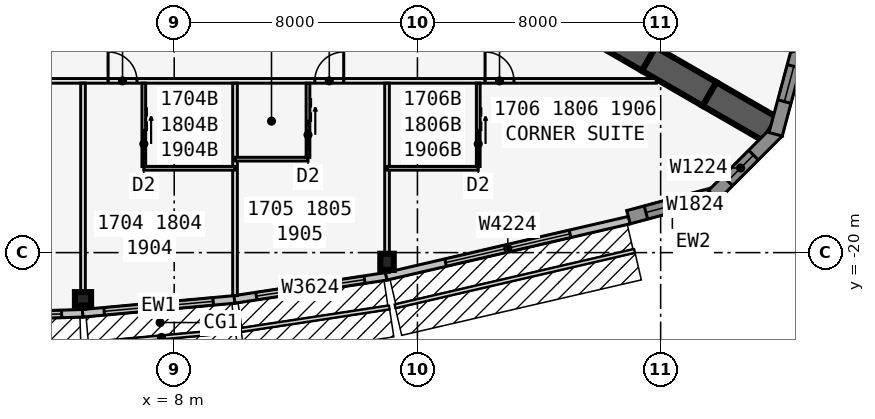
"""IFC4 building model, lengths in metres.
Left out: names, types, materials, properties, quantities, classifications, styles, units other than length and angle.
Written with IfcOpenShell. Run it as: python <this file> out.ifc"""

import sys

from ifc_helpers import new_model, si_unit, direction, frame, frame_2d, origin, origin_2d, place, context, subcontext, project, spatial, polyline, rectangle, i_section, outline, extrude, element, fill, save


model = new_model("IFC4")
c1 = context("Model", 3, precision=1e-05, world=origin(), true_north=direction((0.0, 1.0)))
c2 = subcontext(c1, "Body", "Model", "MODEL_VIEW")
j1 = project(units=[si_unit("LENGTHUNIT", "METRE"), si_unit("PLANEANGLEUNIT", "RADIAN")], contexts=[c1])
p1 = place(None, origin())
s1 = spatial("IfcSite", under=j1, at=p1, CompositionType="ELEMENT")
p2 = place(p1, origin())
s2 = spatial("IfcBuilding", under=s1, at=p2, CompositionType="ELEMENT")
p3 = place(p2, frame((0.0, 0.0, 69.3)))
s3 = spatial("IfcBuildingStorey", under=s2, at=p3, CompositionType="ELEMENT", Elevation=69.3)
for number, where, z_axis, x_axis in (
    (1, (21.61, -12.477, 0.0), (0.0, 0.0, 1.0), (0.866, -0.5, 0.0)),
    (2, (23.61, -13.631, 0.0), (0.0, 0.0, 1.0), (0.866, -0.5, 0.0)),
    (3, (25.61, -14.786, 0.0), (0.0, 0.0, 1.0), (0.866, -0.5, 0.0)),
):
    element("IfcWall", number, at=place(p3, frame(where, z_axis=z_axis, x_axis=x_axis)), inside=s3, PredefinedType="SHEAR", context=c2, shape_type="SweptSolid", body=[
        extrude(rectangle(XDim=2.309, YDim=0.9, at=frame_2d((1.155, 0.0))), origin(), (0.0, 0.0, 1.0), 3.4),
    ])
for number, where, z_axis, x_axis in (
    (4, (5.0, -21.521, 0.0), (0.0, 0.0, 1.0), (0.0, -1.0, 0.0)),
    (5, (15.0, -20.303, 0.0), (0.0, 0.0, 1.0), (1.0, 0.0, 0.0)),
):
    element("IfcColumn", number, at=place(p3, frame(where, z_axis=z_axis, x_axis=x_axis)), inside=s3, PredefinedType="COLUMN", context=c2, shape_type="SweptSolid", body=[
        extrude(i_section(OverallWidth=0.442, OverallDepth=0.531, WebThickness=0.066, FlangeThickness=0.106, at=origin_2d()), origin(), (0.0, 0.0, 1.0), 3.4),
    ])
p4 = place(p3, frame((-0.004, -22.148, 0.0), z_axis=(0.0, 0.0, 1.0), x_axis=(0.999537635046, 0.030405856769, 0.0)))
e6 = element("IfcWall", 6, at=p4, inside=s3, PredefinedType="STANDARD", context=c2, shape_type="SweptSolid", body=[
    extrude(rectangle(XDim=5.002, YDim=0.25, at=frame_2d((2.501, 0.0))), origin(), (0.0, 0.0, 1.0), 3.235),
])
p5 = place(p4, frame((0.701, 0.0, 0.45)))
e7 = element("IfcOpeningElement", 7, at=p5, cuts=e6, PredefinedType="OPENING", context=c2, shape_type="SweptSolid", body=[
    extrude(rectangle(XDim=3.6, YDim=2.4, at=frame_2d((1.8, 1.2))), frame((0.0, 0.135, 0.0), z_axis=(0.0, -1.0, 0.0), x_axis=(1.0, 0.0, 0.0)), (0.0, 0.0, 1.0), 0.27),
])
p6 = place(p3, frame((4.989, -21.996, 0.0), z_axis=(0.0, 0.0, 1.0), x_axis=(0.995857256774, 0.090930325692, 0.0)))
e8 = element("IfcWall", 8, at=p6, inside=s3, PredefinedType="STANDARD", context=c2, shape_type="SweptSolid", body=[
    extrude(rectangle(XDim=5.021, YDim=0.25, at=frame_2d((2.51, 0.0))), origin(), (0.0, 0.0, 1.0), 3.235),
])
p7 = place(p6, frame((0.71, 0.0, 0.45)))
e9 = element("IfcOpeningElement", 9, at=p7, cuts=e8, PredefinedType="OPENING", context=c2, shape_type="SweptSolid", body=[
    extrude(rectangle(XDim=3.6, YDim=2.4, at=frame_2d((1.8, 1.2))), frame((0.0, 0.135, 0.0), z_axis=(0.0, -1.0, 0.0), x_axis=(1.0, 0.0, 0.0)), (0.0, 0.0, 1.0), 0.27),
])
p8 = place(p3, frame((9.981, -21.54, 0.0), z_axis=(0.0, 0.0, 1.0), x_axis=(0.988615403399, 0.150464561152, 0.0)))
e10 = element("IfcWall", 10, at=p8, inside=s3, PredefinedType="STANDARD", context=c2, shape_type="SweptSolid", body=[
    extrude(rectangle(XDim=5.058, YDim=0.25, at=frame_2d((2.529, 0.0))), origin(), (0.0, 0.0, 1.0), 3.235),
])
p9 = place(p8, frame((0.729, 0.0, 0.45)))
e11 = element("IfcOpeningElement", 11, at=p9, cuts=e10, PredefinedType="OPENING", context=c2, shape_type="SweptSolid", body=[
    extrude(rectangle(XDim=3.6, YDim=2.4, at=frame_2d((1.8, 1.2))), frame((0.0, 0.135, 0.0), z_axis=(0.0, -1.0, 0.0), x_axis=(1.0, 0.0, 0.0)), (0.0, 0.0, 1.0), 0.27),
])
p10 = place(p3, frame((14.972, -20.781, 0.0), z_axis=(0.0, 0.0, 1.0), x_axis=(0.974279327392, 0.225343720163, 0.0)))
e12 = element("IfcWall", 12, at=p10, inside=s3, PredefinedType="STANDARD", context=c2, shape_type="SweptSolid", body=[
    extrude(rectangle(XDim=8.211, YDim=0.25, at=frame_2d((4.105, 0.0))), origin(), (0.0, 0.0, 1.0), 3.235),
])
p11 = place(p10, frame((2.006, 0.0, 0.45)))
e13 = element("IfcOpeningElement", 13, at=p11, cuts=e12, PredefinedType="OPENING", context=c2, shape_type="SweptSolid", body=[
    extrude(rectangle(XDim=4.2, YDim=2.4, at=frame_2d((2.1, 1.2))), frame((0.0, 0.135, 0.0), z_axis=(0.0, -1.0, 0.0), x_axis=(1.0, 0.0, 0.0)), (0.0, 0.0, 1.0), 0.27),
])
p12 = place(p3, frame((22.942, -18.835, 0.0), z_axis=(0.0, 0.0, 1.0), x_axis=(0.965930548995, 0.258801419081, 0.0)))
e14 = element("IfcWall", 14, at=p12, inside=s3, PredefinedType="SOLIDWALL", context=c2, shape_type="SweptSolid", body=[
    extrude(rectangle(XDim=2.989, YDim=0.45, at=frame_2d((1.494, 0.0))), origin(), (0.0, 0.0, 1.0), 3.235),
])
p13 = place(p12, frame((0.594, 0.0, 0.45)))
e15 = element("IfcOpeningElement", 15, at=p13, cuts=e14, PredefinedType="OPENING", context=c2, shape_type="SweptSolid", body=[
    extrude(rectangle(XDim=1.8, YDim=2.4, at=frame_2d((0.9, 1.2))), frame((0.0, 0.235, 0.0), z_axis=(0.0, -1.0, 0.0), x_axis=(1.0, 0.0, 0.0)), (0.0, 0.0, 1.0), 0.47),
])
p14 = place(p3, frame((25.728, -18.12, 0.0), z_axis=(0.0, 0.0, 1.0), x_axis=(0.707025086683, 0.707188466253, 0.0)))
e16 = element("IfcWall", 16, at=p14, inside=s3, PredefinedType="SOLIDWALL", context=c2, shape_type="SweptSolid", body=[
    extrude(outline(polyline([(2.989, 0.225), (2.93, 0.225), (2.438, 0.093), (2.402, 0.225), (0.0, 0.225), (0.0, -0.225), (2.989, -0.225), (2.989, 0.225)])), origin(), (0.0, 0.0, 1.0), 3.235),
])
p15 = place(p14, frame((0.676, 0.0, 0.45)))
e17 = element("IfcOpeningElement", 17, at=p15, cuts=e16, PredefinedType="OPENING", context=c2, shape_type="SweptSolid", body=[
    extrude(rectangle(XDim=1.2, YDim=2.4, at=frame_2d((0.6, 1.2))), frame((0.0, 0.235, 0.0), z_axis=(0.0, -1.0, 0.0), x_axis=(1.0, 0.0, 0.0)), (0.0, 0.0, 1.0), 0.47),
])
p16 = place(p3, frame((27.783, -16.108, 0.0), z_axis=(0.0, 0.0, 1.0), x_axis=(0.258801419081, 0.965930548995, 0.0)))
e18 = element("IfcWall", 18, at=p16, inside=s3, PredefinedType="SOLIDWALL", context=c2, shape_type="SweptSolid", body=[
    extrude(outline(polyline([(2.989, 0.225), (0.586, 0.225), (0.551, 0.093), (0.06, 0.225), (0.0, 0.225), (0.0, -0.225), (2.989, -0.225), (2.989, 0.225)])), origin(), (0.0, 0.0, 1.0), 3.235),
])
p17 = place(p16, frame((1.113, 0.0, 0.45)))
e19 = element("IfcOpeningElement", 19, at=p17, cuts=e18, PredefinedType="OPENING", context=c2, shape_type="SweptSolid", body=[
    extrude(rectangle(XDim=1.2, YDim=2.4, at=frame_2d((0.6, 1.2))), frame((0.0, 0.235, 0.0), z_axis=(0.0, -1.0, 0.0), x_axis=(1.0, 0.0, 0.0)), (0.0, 0.0, 1.0), 0.47),
])
p18 = place(p3, frame((-23.857, -14.351, 0.0), z_axis=(0.0, 0.0, 1.0), x_axis=(1.0, 0.0, 0.0)))
e20 = element("IfcWall", 20, at=p18, inside=s3, PredefinedType="PARTITIONING", context=c2, shape_type="SweptSolid", body=[
    extrude(rectangle(XDim=47.714, YDim=0.15, at=frame_2d((23.857, 0.0))), origin(), (0.0, 0.0, 1.0), 3.235),
])
p19 = place(p18, frame((4.682, 0.0, 0.0)))
e21 = element("IfcOpeningElement", 21, at=p19, cuts=e20, PredefinedType="OPENING", context=c2, shape_type="SweptSolid", body=[
    extrude(rectangle(XDim=0.95, YDim=2.13, at=frame_2d((0.475, 1.065))), frame((0.0, 0.085, 0.0), z_axis=(0.0, -1.0, 0.0), x_axis=(1.0, 0.0, 0.0)), (0.0, 0.0, 1.0), 0.17),
])
p20 = place(p18, frame((10.282, 0.0, 0.0)))
e22 = element("IfcOpeningElement", 22, at=p20, cuts=e20, PredefinedType="OPENING", context=c2, shape_type="SweptSolid", body=[
    extrude(rectangle(XDim=0.95, YDim=2.13, at=frame_2d((0.475, 1.065))), frame((0.0, 0.085, 0.0), z_axis=(0.0, -1.0, 0.0), x_axis=(1.0, 0.0, 0.0)), (0.0, 0.0, 1.0), 0.17),
])
p21 = place(p18, frame((15.882, 0.0, 0.0)))
e23 = element("IfcOpeningElement", 23, at=p21, cuts=e20, PredefinedType="OPENING", context=c2, shape_type="SweptSolid", body=[
    extrude(rectangle(XDim=0.95, YDim=2.13, at=frame_2d((0.475, 1.065))), frame((0.0, 0.085, 0.0), z_axis=(0.0, -1.0, 0.0), x_axis=(1.0, 0.0, 0.0)), (0.0, 0.0, 1.0), 0.17),
])
p22 = place(p18, frame((25.857, 0.0, 0.0)))
e24 = element("IfcOpeningElement", 24, at=p22, cuts=e20, PredefinedType="OPENING", context=c2, shape_type="SweptSolid", body=[
    extrude(rectangle(XDim=1.0, YDim=2.13, at=frame_2d((0.5, 1.065))), frame((0.0, 0.085, 0.0), z_axis=(0.0, -1.0, 0.0), x_axis=(1.0, 0.0, 0.0)), (0.0, 0.0, 1.0), 0.17),
])
p23 = place(p18, frame((29.682, 0.0, 0.0)))
e25 = element("IfcOpeningElement", 25, at=p23, cuts=e20, PredefinedType="OPENING", context=c2, shape_type="SweptSolid", body=[
    extrude(rectangle(XDim=0.95, YDim=2.13, at=frame_2d((0.475, 1.065))), frame((0.0, 0.085, 0.0), z_axis=(0.0, -1.0, 0.0), x_axis=(1.0, 0.0, 0.0)), (0.0, 0.0, 1.0), 0.17),
])
p24 = place(p18, frame((36.482, 0.0, 0.0)))
e26 = element("IfcOpeningElement", 26, at=p24, cuts=e20, PredefinedType="OPENING", context=c2, shape_type="SweptSolid", body=[
    extrude(rectangle(XDim=0.95, YDim=2.13, at=frame_2d((0.475, 1.065))), frame((0.0, 0.085, 0.0), z_axis=(0.0, -1.0, 0.0), x_axis=(1.0, 0.0, 0.0)), (0.0, 0.0, 1.0), 0.17),
])
p25 = place(p18, frame((42.082, 0.0, 0.0)))
e27 = element("IfcOpeningElement", 27, at=p25, cuts=e20, PredefinedType="OPENING", context=c2, shape_type="SweptSolid", body=[
    extrude(rectangle(XDim=0.95, YDim=2.13, at=frame_2d((0.475, 1.065))), frame((0.0, 0.085, 0.0), z_axis=(0.0, -1.0, 0.0), x_axis=(1.0, 0.0, 0.0)), (0.0, 0.0, 1.0), 0.17),
])
p26 = place(p3, frame((5.0, -14.426, 0.0), z_axis=(0.0, 0.0, 1.0), x_axis=(0.0, -1.0, 0.0)))
e28 = element("IfcWall", 28, at=p26, inside=s3, PredefinedType="PARTITIONING", context=c2, shape_type="SweptSolid", body=[
    extrude(rectangle(XDim=7.443, YDim=0.15, at=frame_2d((3.722, 0.0))), origin(), (0.0, 0.0, 1.0), 2.389),
])
p27 = place(p3, frame((10.0, -14.426, 0.0), z_axis=(0.0, 0.0, 1.0), x_axis=(0.0, -1.0, 0.0)))
e29 = element("IfcWall", 29, at=p27, inside=s3, PredefinedType="PARTITIONING", context=c2, shape_type="SweptSolid", body=[
    extrude(rectangle(XDim=6.985, YDim=0.15, at=frame_2d((3.492, 0.0))), origin(), (0.0, 0.0, 1.0), 2.389),
])
p28 = place(p3, frame((15.0, -14.426, 0.0), z_axis=(0.0, 0.0, 1.0), x_axis=(0.0, -1.0, 0.0)))
e30 = element("IfcWall", 30, at=p28, inside=s3, PredefinedType="PARTITIONING", context=c2, shape_type="SweptSolid", body=[
    extrude(rectangle(XDim=6.22, YDim=0.15, at=frame_2d((3.11, 0.0))), origin(), (0.0, 0.0, 1.0), 2.389),
])
p29 = place(p3, frame((7.0, -17.226, 0.0), z_axis=(0.0, 0.0, 1.0), x_axis=(1.0, 0.0, 0.0)))
e31 = element("IfcWall", 31, at=p29, inside=s3, PredefinedType="PLUMBINGWALL", context=c2, shape_type="SweptSolid", body=[
    extrude(rectangle(XDim=3.0, YDim=0.12, at=frame_2d((1.5, 0.0))), origin(), (0.0, 0.0, 1.0), 3.235),
])
p30 = place(p3, frame((7.0, -14.426, 0.0), z_axis=(0.0, 0.0, 1.0), x_axis=(0.0, -1.0, 0.0)))
e32 = element("IfcWall", 32, at=p30, inside=s3, PredefinedType="PLUMBINGWALL", context=c2, shape_type="SweptSolid", body=[
    extrude(rectangle(XDim=2.74, YDim=0.12, at=frame_2d((1.37, 0.0))), origin(), (0.0, 0.0, 1.0), 3.235),
])
p31 = place(p30, frame((1.55, 0.0, 0.0)))
e33 = element("IfcOpeningElement", 33, at=p31, cuts=e32, PredefinedType="OPENING", context=c2, shape_type="SweptSolid", body=[
    extrude(rectangle(XDim=0.9, YDim=2.13, at=frame_2d((0.45, 1.065))), frame((0.0, 0.07, 0.0), z_axis=(0.0, -1.0, 0.0), x_axis=(1.0, 0.0, 0.0)), (0.0, 0.0, 1.0), 0.14),
])
p32 = place(p3, frame((10.0, -16.926, 0.0), z_axis=(0.0, 0.0, 1.0), x_axis=(1.0, 0.0, 0.0)))
e34 = element("IfcWall", 34, at=p32, inside=s3, PredefinedType="PLUMBINGWALL", context=c2, shape_type="SweptSolid", body=[
    extrude(rectangle(XDim=2.4, YDim=0.12, at=frame_2d((1.2, 0.0))), origin(), (0.0, 0.0, 1.0), 3.235),
])
p33 = place(p3, frame((12.4, -14.426, 0.0), z_axis=(0.0, 0.0, 1.0), x_axis=(0.0, -1.0, 0.0)))
e35 = element("IfcWall", 35, at=p33, inside=s3, PredefinedType="PLUMBINGWALL", context=c2, shape_type="SweptSolid", body=[
    extrude(rectangle(XDim=2.44, YDim=0.12, at=frame_2d((1.22, 0.0))), origin(), (0.0, 0.0, 1.0), 3.235),
])
p34 = place(p33, frame((1.25, 0.0, 0.0)))
e36 = element("IfcOpeningElement", 36, at=p34, cuts=e35, PredefinedType="OPENING", context=c2, shape_type="SweptSolid", body=[
    extrude(rectangle(XDim=0.9, YDim=2.13, at=frame_2d((0.45, 1.065))), frame((0.0, 0.07, 0.0), z_axis=(0.0, -1.0, 0.0), x_axis=(1.0, 0.0, 0.0)), (0.0, 0.0, 1.0), 0.14),
])
p35 = place(p3, frame((15.0, -17.226, 0.0), z_axis=(0.0, 0.0, 1.0), x_axis=(1.0, 0.0, 0.0)))
e37 = element("IfcWall", 37, at=p35, inside=s3, PredefinedType="PLUMBINGWALL", context=c2, shape_type="SweptSolid", body=[
    extrude(rectangle(XDim=3.0, YDim=0.12, at=frame_2d((1.5, 0.0))), origin(), (0.0, 0.0, 1.0), 3.235),
])
p36 = place(p3, frame((18.0, -14.426, 0.0), z_axis=(0.0, 0.0, 1.0), x_axis=(0.0, -1.0, 0.0)))
e38 = element("IfcWall", 38, at=p36, inside=s3, PredefinedType="PLUMBINGWALL", context=c2, shape_type="SweptSolid", body=[
    extrude(rectangle(XDim=2.74, YDim=0.12, at=frame_2d((1.37, 0.0))), origin(), (0.0, 0.0, 1.0), 3.235),
])
p37 = place(p36, frame((1.55, 0.0, 0.0)))
e39 = element("IfcOpeningElement", 39, at=p37, cuts=e38, PredefinedType="OPENING", context=c2, shape_type="SweptSolid", body=[
    extrude(rectangle(XDim=0.9, YDim=2.13, at=frame_2d((0.45, 1.065))), frame((0.0, 0.07, 0.0), z_axis=(0.0, -1.0, 0.0), x_axis=(1.0, 0.0, 0.0)), (0.0, 0.0, 1.0), 0.14),
])
p38 = place(p5, origin())
e40 = element("IfcWindow", 40, at=p38, inside=s3, PartitioningType="SINGLE_PANEL", PredefinedType="WINDOW", context=c2, shape_type="SweptSolid", body=[
    extrude(rectangle(XDim=3.6, YDim=2.4, at=frame_2d((1.8, 1.2))), frame((0.0, 0.03, 0.0), z_axis=(0.0, -1.0, 0.0), x_axis=(1.0, 0.0, 0.0)), (0.0, 0.0, 1.0), 0.06),
])
fill(e7, e40)
p39 = place(p7, origin())
e41 = element("IfcWindow", 41, at=p39, inside=s3, PartitioningType="SINGLE_PANEL", PredefinedType="WINDOW", context=c2, shape_type="SweptSolid", body=[
    extrude(rectangle(XDim=3.6, YDim=2.4, at=frame_2d((1.8, 1.2))), frame((0.0, 0.03, 0.0), z_axis=(0.0, -1.0, 0.0), x_axis=(1.0, 0.0, 0.0)), (0.0, 0.0, 1.0), 0.06),
])
fill(e9, e41)
p40 = place(p9, origin())
e42 = element("IfcWindow", 42, at=p40, inside=s3, PartitioningType="SINGLE_PANEL", PredefinedType="WINDOW", context=c2, shape_type="SweptSolid", body=[
    extrude(rectangle(XDim=3.6, YDim=2.4, at=frame_2d((1.8, 1.2))), frame((0.0, 0.03, 0.0), z_axis=(0.0, -1.0, 0.0), x_axis=(1.0, 0.0, 0.0)), (0.0, 0.0, 1.0), 0.06),
])
fill(e11, e42)
p41 = place(p11, origin())
e43 = element("IfcWindow", 43, at=p41, inside=s3, PartitioningType="SINGLE_PANEL", PredefinedType="WINDOW", context=c2, shape_type="SweptSolid", body=[
    extrude(rectangle(XDim=4.2, YDim=2.4, at=frame_2d((2.1, 1.2))), frame((0.0, 0.03, 0.0), z_axis=(0.0, -1.0, 0.0), x_axis=(1.0, 0.0, 0.0)), (0.0, 0.0, 1.0), 0.06),
])
fill(e13, e43)
p42 = place(p13, origin())
e44 = element("IfcWindow", 44, at=p42, inside=s3, PartitioningType="SINGLE_PANEL", PredefinedType="WINDOW", context=c2, shape_type="SweptSolid", body=[
    extrude(rectangle(XDim=1.8, YDim=2.4, at=frame_2d((0.9, 1.2))), frame((0.0, 0.03, 0.0), z_axis=(0.0, -1.0, 0.0), x_axis=(1.0, 0.0, 0.0)), (0.0, 0.0, 1.0), 0.06),
])
fill(e15, e44)
p43 = place(p15, origin())
e45 = element("IfcWindow", 45, at=p43, inside=s3, PartitioningType="SINGLE_PANEL", PredefinedType="WINDOW", context=c2, shape_type="SweptSolid", body=[
    extrude(rectangle(XDim=1.2, YDim=2.4, at=frame_2d((0.6, 1.2))), frame((0.0, 0.03, 0.0), z_axis=(0.0, -1.0, 0.0), x_axis=(1.0, 0.0, 0.0)), (0.0, 0.0, 1.0), 0.06),
])
fill(e17, e45)
p44 = place(p17, origin())
e46 = element("IfcWindow", 46, at=p44, inside=s3, PartitioningType="SINGLE_PANEL", PredefinedType="WINDOW", context=c2, shape_type="SweptSolid", body=[
    extrude(rectangle(XDim=1.2, YDim=2.4, at=frame_2d((0.6, 1.2))), frame((0.0, 0.03, 0.0), z_axis=(0.0, -1.0, 0.0), x_axis=(1.0, 0.0, 0.0)), (0.0, 0.0, 1.0), 0.06),
])
fill(e19, e46)
p45 = place(p31, origin())
e47 = element("IfcDoor", 47, at=p45, inside=s3, OperationType="SLIDING_TO_LEFT", PredefinedType="DOOR", context=c2, shape_type="SweptSolid", body=[
    extrude(rectangle(XDim=0.9, YDim=2.13, at=frame_2d((0.45, 1.065))), frame((0.0, 0.025, 0.0), z_axis=(0.0, -1.0, 0.0), x_axis=(1.0, 0.0, 0.0)), (0.0, 0.0, 1.0), 0.05),
])
fill(e33, e47)
p46 = place(p23, origin())
e48 = element("IfcDoor", 48, at=p46, inside=s3, OperationType="SINGLE_SWING_LEFT", PredefinedType="DOOR", context=c2, shape_type="SweptSolid", body=[
    extrude(rectangle(XDim=0.95, YDim=2.13, at=frame_2d((0.475, 1.065))), frame((0.0, 0.025, 0.0), z_axis=(0.0, -1.0, 0.0), x_axis=(1.0, 0.0, 0.0)), (0.0, 0.0, 1.0), 0.05),
])
fill(e25, e48)
p47 = place(p34, origin())
e49 = element("IfcDoor", 49, at=p47, inside=s3, OperationType="SLIDING_TO_LEFT", PredefinedType="DOOR", context=c2, shape_type="SweptSolid", body=[
    extrude(rectangle(XDim=0.9, YDim=2.13, at=frame_2d((0.45, 1.065))), frame((0.0, 0.025, 0.0), z_axis=(0.0, -1.0, 0.0), x_axis=(1.0, 0.0, 0.0)), (0.0, 0.0, 1.0), 0.05),
])
fill(e36, e49)
p48 = place(p24, origin())
e50 = element("IfcDoor", 50, at=p48, inside=s3, OperationType="SINGLE_SWING_RIGHT", PredefinedType="DOOR", context=c2, shape_type="SweptSolid", body=[
    extrude(rectangle(XDim=0.95, YDim=2.13, at=frame_2d((0.475, 1.065))), frame((0.0, 0.025, 0.0), z_axis=(0.0, -1.0, 0.0), x_axis=(1.0, 0.0, 0.0)), (0.0, 0.0, 1.0), 0.05),
])
fill(e26, e50)
p49 = place(p37, origin())
e51 = element("IfcDoor", 51, at=p49, inside=s3, OperationType="SLIDING_TO_LEFT", PredefinedType="DOOR", context=c2, shape_type="SweptSolid", body=[
    extrude(rectangle(XDim=0.9, YDim=2.13, at=frame_2d((0.45, 1.065))), frame((0.0, 0.025, 0.0), z_axis=(0.0, -1.0, 0.0), x_axis=(1.0, 0.0, 0.0)), (0.0, 0.0, 1.0), 0.05),
])
fill(e39, e51)
p50 = place(p25, origin())
e52 = element("IfcDoor", 52, at=p50, inside=s3, OperationType="SINGLE_SWING_LEFT", PredefinedType="DOOR", context=c2, shape_type="SweptSolid", body=[
    extrude(rectangle(XDim=0.95, YDim=2.13, at=frame_2d((0.475, 1.065))), frame((0.0, 0.025, 0.0), z_axis=(0.0, -1.0, 0.0), x_axis=(1.0, 0.0, 0.0)), (0.0, 0.0, 1.0), 0.05),
])
fill(e27, e52)
save(model, sys.argv[1])
